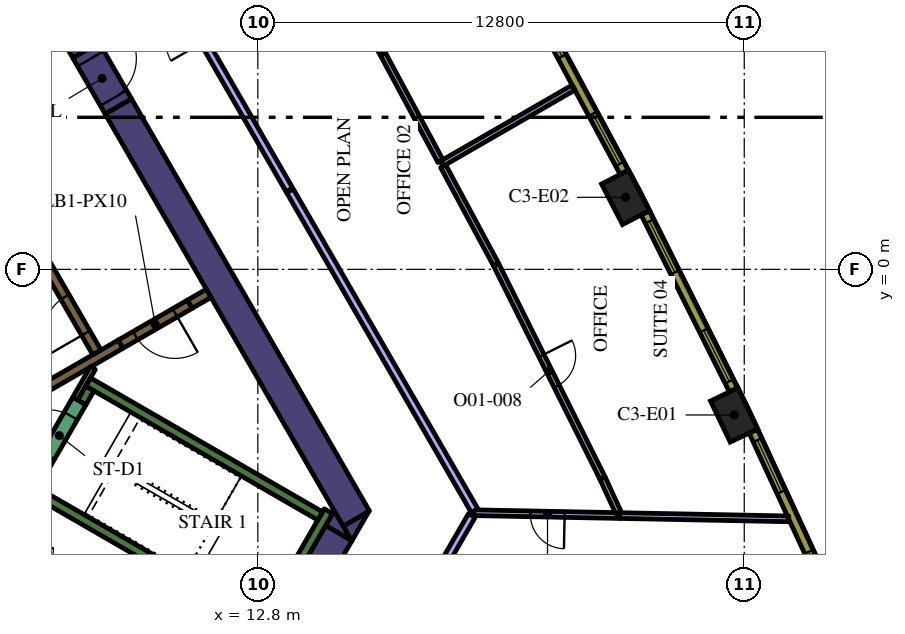
"""IFC4 building model, lengths in metres.
Left out: names, types, materials, properties, quantities, classifications, styles, units other than length and angle.
Written with IfcOpenShell. Run it as: python <this file> out.ifc"""

import sys

from ifc_helpers import new_model, si_unit, direction, frame, frame_2d, origin, origin_2d, place, context, subcontext, project, spatial, polyline, rectangle, outline, extrude, element, fill, save


model = new_model("IFC4")
c1 = context("Model", 3, precision=1e-05, world=origin(), true_north=direction((0.0, 1.0)))
c2 = subcontext(c1, "Body", "Model", "MODEL_VIEW")
j1 = project(units=[si_unit("LENGTHUNIT", "METRE"), si_unit("PLANEANGLEUNIT", "RADIAN")], contexts=[c1])
p1 = place(None, origin())
s1 = spatial("IfcSite", under=j1, at=p1, CompositionType="ELEMENT")
p2 = place(p1, origin())
s2 = spatial("IfcBuilding", under=s1, at=p2, CompositionType="ELEMENT")
p3 = place(p2, frame((0.0, 0.0, 145.8)))
s3 = spatial("IfcBuildingStorey", under=s2, at=p3, CompositionType="ELEMENT", Elevation=145.8)
for number, where, z_axis, x_axis in (
    (1, (25.332, -3.832, 0.0), (0.0, 0.0, 1.0), (-0.433, 0.902, 0.0)),
    (2, (22.476, 1.896, 0.0), (0.0, 0.0, 1.0), (-0.46, 0.888, 0.0)),
):
    element("IfcColumn", number, at=place(p3, frame(where, z_axis=z_axis, x_axis=x_axis)), inside=s3, PredefinedType="COLUMN", context=c2, shape_type="SweptSolid", body=[
        extrude(rectangle(XDim=1.2, YDim=0.8, at=origin_2d()), origin(), (0.0, 0.0, 1.0), 4.2),
    ])
p4 = place(p3, frame((9.129, 4.289, 0.0), z_axis=(0.0, 0.0, 1.0), x_axis=(0.499995742806, -0.866027861663, 0.0)))
e3 = element("IfcWall", 3, at=p4, inside=s3, PredefinedType="SOLIDWALL", context=c2, shape_type="SweptSolid", body=[
    extrude(rectangle(XDim=12.527, YDim=0.8, at=frame_2d((6.264, 0.0))), origin(), (0.0, 0.0, 1.0), 4.2),
])
p5 = place(p3, origin())
e4 = element("IfcWall", 4, at=p5, inside=s3, PredefinedType="SOLIDWALL", context=c2, shape_type="SweptSolid", body=[
    extrude(outline(polyline([(15.271, -7.15), (15.047, -6.762), (15.719, -6.374), (15.271, -7.15)])), origin(), (0.0, 0.0, 1.0), 4.2),
])
p6 = place(p3, frame((13.018, -10.252, 0.0), z_axis=(0.0, 0.0, 1.0), x_axis=(0.499984020225, 0.866034629516, 0.0)))
e5 = element("IfcWall", 5, at=p6, inside=s3, PredefinedType="SOLIDWALL", context=c2, shape_type="SweptSolid", body=[
    extrude(rectangle(XDim=3.824, YDim=0.8, at=frame_2d((1.912, 0.0))), origin(), (0.0, 0.0, 1.0), 4.2),
])
e6 = element("IfcWall", 6, at=p5, inside=s3, PredefinedType="SOLIDWALL", context=c2, shape_type="SweptSolid", body=[
    extrude(outline(polyline([(14.809, -6.35), (15.257, -7.126), (14.585, -6.738), (14.809, -6.35)])), origin(), (0.0, 0.0, 1.0), 4.2),
])
p7 = place(p3, frame((5.615, 10.375, 0.0), z_axis=(0.0, 0.0, 1.0), x_axis=(0.500002746266, -0.866023818221, 0.0)))
e7 = element("IfcWall", 7, at=p7, inside=s3, PredefinedType="SOLIDWALL", context=c2, shape_type="SweptSolid", body=[
    extrude(rectangle(XDim=5.328, YDim=0.8, at=frame_2d((2.664, 0.0))), origin(), (0.0, 0.0, 1.0), 4.2),
])
p8 = place(p3, frame((12.84, -9.511, 0.0), z_axis=(0.0, 0.0, 1.0), x_axis=(0.499997733992, 0.866026712061, 0.0)))
e8 = element("IfcWall", 8, at=p8, inside=s3, PredefinedType="SOLIDWALL", context=c2, shape_type="SweptSolid", body=[
    extrude(rectangle(XDim=3.634, YDim=0.25, at=frame_2d((1.817, 0.0))), origin(), (0.0, 0.0, 1.0), 4.2),
])
p9 = place(p3, frame((12.84, -9.261, 0.0), z_axis=(0.0, 0.0, 1.0), x_axis=(-0.866013990052, 0.500019768644, 0.0)))
e9 = element("IfcWall", 9, at=p9, inside=s3, PredefinedType="SOLIDWALL", context=c2, shape_type="SweptSolid", body=[
    extrude(rectangle(XDim=6.8, YDim=0.25, at=frame_2d((3.4, 0.0))), origin(), (0.0, 0.0, 1.0), 4.2),
])
p10 = place(p3, frame((8.334, -2.964, 0.0), z_axis=(0.0, 0.0, 1.0), x_axis=(0.866016039709, -0.500016218704, 0.0)))
e10 = element("IfcWall", 10, at=p10, inside=s3, PredefinedType="SOLIDWALL", context=c2, shape_type="SweptSolid", body=[
    extrude(rectangle(XDim=7.05, YDim=0.25, at=frame_2d((3.525, 0.0))), origin(), (0.0, 0.0, 1.0), 4.2),
])
p11 = place(p3, frame((8.168, -3.503, 0.0), z_axis=(0.0, 0.0, 1.0), x_axis=(0.49972245349, 0.866185586049, 0.0)))
e11 = element("IfcWall", 11, at=p11, inside=s3, PredefinedType="SOLIDWALL", context=c2, shape_type="SweptSolid", body=[
    extrude(rectangle(XDim=0.425, YDim=0.25, at=frame_2d((0.212, 0.0))), origin(), (0.0, 0.0, 1.0), 4.2),
])
p12 = place(p3, frame((9.19, -1.969, 0.0), z_axis=(0.0, 0.0, 1.0), x_axis=(-0.866057109641, -0.499945079824, 0.0)))
e12 = element("IfcWall", 12, at=p12, inside=s3, PredefinedType="SOLIDWALL", context=c2, shape_type="SweptSolid", body=[
    extrude(rectangle(XDim=3.291, YDim=0.25, at=frame_2d((1.646, 0.0))), origin(), (0.0, 0.0, 1.0), 4.2),
])
p13 = place(p3, frame((11.507, -0.631, 0.0), z_axis=(0.0, 0.0, 1.0), x_axis=(-0.866093731455, -0.499881634324, 0.0)))
e13 = element("IfcWall", 13, at=p13, inside=s3, PredefinedType="SOLIDWALL", context=c2, shape_type="SweptSolid", body=[
    extrude(rectangle(XDim=0.575, YDim=0.25, at=frame_2d((0.288, 0.0))), origin(), (0.0, 0.0, 1.0), 4.2),
])
p14 = place(p3, frame((8.459, -2.599, 0.0), z_axis=(0.0, 0.0, 1.0), x_axis=(-0.500041054325, -0.866001699761, 0.0)))
e14 = element("IfcWall", 14, at=p14, inside=s3, PredefinedType="PARTITIONING", context=c2, shape_type="SweptSolid", body=[
    extrude(rectangle(XDim=0.929, YDim=0.15, at=frame_2d((0.464, 0.0))), origin(), (0.0, 0.0, 1.0), 4.2),
])
p15 = place(p3, frame((8.565, -2.185, 0.0), z_axis=(0.0, 0.0, 1.0), x_axis=(-0.499997954832, 0.866026584559, 0.0)))
e15 = element("IfcWall", 15, at=p15, inside=s3, PredefinedType="SOLIDWALL", context=c2, shape_type="SweptSolid", body=[
    extrude(rectangle(XDim=12.35, YDim=0.25, at=frame_2d((6.175, 0.0))), origin(), (0.0, 0.0, 1.0), 4.2),
])
p16 = place(p15, frame((0.585, 0.0, 0.0)))
e16 = element("IfcOpeningElement", 16, at=p16, cuts=e15, PredefinedType="OPENING", context=c2, shape_type="SweptSolid", body=[
    extrude(rectangle(XDim=1.1, YDim=2.1, at=frame_2d((0.55, 1.05))), frame((0.0, 0.135, 0.0), z_axis=(0.0, -1.0, 0.0), x_axis=(1.0, 0.0, 0.0)), (0.0, 0.0, 1.0), 0.27),
])
p17 = place(p3, frame((7.053, -5.284, 0.0), z_axis=(0.0, 0.0, 1.0), x_axis=(0.500078061341, 0.865980330357, 0.0)))
e17 = element("IfcWall", 17, at=p17, inside=s3, PredefinedType="SOLIDWALL", context=c2, shape_type="SweptSolid", body=[
    extrude(rectangle(XDim=2.1, YDim=0.4, at=frame_2d((1.05, 0.0))), origin(), (0.0, 0.0, 1.0), 4.2),
])
p18 = place(p17, frame((0.45, 0.0, 0.0)))
e18 = element("IfcOpeningElement", 18, at=p18, cuts=e17, PredefinedType="OPENING", context=c2, shape_type="SweptSolid", body=[
    extrude(rectangle(XDim=1.2, YDim=2.1, at=frame_2d((0.6, 1.05))), frame((0.0, 0.21, 0.0), z_axis=(0.0, -1.0, 0.0), x_axis=(1.0, 0.0, 0.0)), (0.0, 0.0, 1.0), 0.42),
])
p19 = place(p3, frame((11.009, -0.919, 0.0), z_axis=(0.0, 0.0, 1.0), x_axis=(-0.866059744384, -0.49994051562, 0.0)))
e19 = element("IfcWall", 19, at=p19, inside=s3, PredefinedType="SOLIDWALL", context=c2, shape_type="SweptSolid", body=[
    extrude(rectangle(XDim=2.1, YDim=0.25, at=frame_2d((1.05, 0.0))), origin(), (0.0, 0.0, 1.0), 4.2),
])
p20 = place(p19, frame((0.45, 0.0, 0.0)))
e20 = element("IfcOpeningElement", 20, at=p20, cuts=e19, PredefinedType="OPENING", context=c2, shape_type="SweptSolid", body=[
    extrude(rectangle(XDim=1.2, YDim=2.1, at=frame_2d((0.6, 1.05))), frame((0.0, 0.135, 0.0), z_axis=(0.0, -1.0, 0.0), x_axis=(1.0, 0.0, 0.0)), (0.0, 0.0, 1.0), 0.27),
])
p21 = place(p3, frame((8.279, 5.761, 0.0), z_axis=(0.0, 0.0, 1.0), x_axis=(0.500062241894, -0.865989465428, 0.0)))
e21 = element("IfcWall", 21, at=p21, inside=s3, PredefinedType="SOLIDWALL", context=c2, shape_type="SweptSolid", body=[
    extrude(rectangle(XDim=1.7, YDim=0.8, at=frame_2d((0.85, 0.0))), origin(), (0.0, 0.0, 1.0), 4.2),
])
p22 = place(p21, frame((0.25, 0.0, 0.0)))
e22 = element("IfcOpeningElement", 22, at=p22, cuts=e21, PredefinedType="OPENING", context=c2, shape_type="SweptSolid", body=[
    extrude(rectangle(XDim=1.2, YDim=2.1, at=frame_2d((0.6, 1.05))), frame((0.0, 0.41, 0.0), z_axis=(0.0, -1.0, 0.0), x_axis=(1.0, 0.0, 0.0)), (0.0, 0.0, 1.0), 0.82),
])
p23 = place(p3, frame((22.32, -6.479, 0.0), z_axis=(0.0, 0.0, 1.0), x_axis=(0.999809252738, -0.019530953357, 0.0)))
e23 = element("IfcWall", 23, at=p23, inside=s3, PredefinedType="PARTITIONING", context=c2, shape_type="SweptSolid", body=[
    extrude(rectangle(XDim=4.45, YDim=0.15, at=frame_2d((2.225, 0.0))), origin(), (0.0, 0.0, 1.0), 3.15),
])
p24 = place(p3, frame((22.328, -6.479, 0.0), z_axis=(0.0, 0.0, 1.0), x_axis=(-0.999809811932, 0.019502306655, 0.0)))
e24 = element("IfcWall", 24, at=p24, inside=s3, PredefinedType="PARTITIONING", context=c2, shape_type="SweptSolid", body=[
    extrude(rectangle(XDim=3.856, YDim=0.15, at=frame_2d((1.928, 0.0))), origin(), (0.0, 0.0, 1.0), 3.15),
])
p25 = place(p24, frame((1.456, 0.0, 0.0)))
e25 = element("IfcOpeningElement", 25, at=p25, cuts=e24, PredefinedType="OPENING", context=c2, shape_type="SweptSolid", body=[
    extrude(rectangle(XDim=0.9, YDim=2.1, at=frame_2d((0.45, 1.05))), frame((0.0, 0.085, 0.0), z_axis=(0.0, -1.0, 0.0), x_axis=(1.0, 0.0, 0.0)), (0.0, 0.0, 1.0), 0.17),
])
p26 = place(p3, frame((16.678, -9.513, 0.0), z_axis=(0.0, 0.0, 1.0), x_axis=(0.500011844827, 0.866018565062, 0.0)))
e26 = element("IfcWall", 26, at=p26, inside=s3, PredefinedType="PARTITIONING", context=c2, shape_type="SweptSolid", body=[
    extrude(rectangle(XDim=3.505, YDim=0.2, at=frame_2d((1.753, 0.0))), origin(), (0.0, 0.0, 1.0), 3.15),
])
p27 = place(p3, frame((17.641, 2.781, 0.0), z_axis=(0.0, 0.0, 1.0), x_axis=(0.866053520969, 0.499951296445, 0.0)))
e27 = element("IfcWall", 27, at=p27, inside=s3, PredefinedType="PARTITIONING", context=c2, shape_type="SweptSolid", body=[
    extrude(rectangle(XDim=4.002, YDim=0.15, at=frame_2d((2.001, 0.0))), origin(), (0.0, 0.0, 1.0), 3.15),
])
p28 = place(p3, frame((22.289, -6.403, 0.0), z_axis=(0.0, 0.0, 1.0), x_axis=(-0.41893460807, 0.908016406328, 0.0)))
e28 = element("IfcWall", 28, at=p28, inside=s3, PredefinedType="PARTITIONING", context=c2, shape_type="SweptSolid", body=[
    extrude(rectangle(XDim=1.002, YDim=0.15, at=frame_2d((0.501, 0.0))), origin(), (0.0, 0.0, 1.0), 3.15),
])
p29 = place(p3, frame((19.066, 0.129, 0.0), z_axis=(0.0, 0.0, 1.0), x_axis=(0.446202922071, -0.89493181435, 0.0)))
e29 = element("IfcWall", 29, at=p29, inside=s3, PredefinedType="PARTITIONING", context=c2, shape_type="SweptSolid", body=[
    extrude(rectangle(XDim=6.282, YDim=0.15, at=frame_2d((3.141, 0.0))), origin(), (0.0, 0.0, 1.0), 3.15),
])
p30 = place(p29, frame((2.683, 0.0, 0.0)))
e30 = element("IfcOpeningElement", 30, at=p30, cuts=e29, PredefinedType="OPENING", context=c2, shape_type="SweptSolid", body=[
    extrude(rectangle(XDim=0.9, YDim=2.1, at=frame_2d((0.45, 1.05))), frame((0.0, 0.085, 0.0), z_axis=(0.0, -1.0, 0.0), x_axis=(1.0, 0.0, 0.0)), (0.0, 0.0, 1.0), 0.17),
])
p31 = place(p3, frame((19.066, 0.129, 0.0), z_axis=(0.0, 0.0, 1.0), x_axis=(-0.473335829303, 0.880882053795, 0.0)))
e31 = element("IfcWall", 31, at=p31, inside=s3, PredefinedType="PARTITIONING", context=c2, shape_type="SweptSolid", body=[
    extrude(rectangle(XDim=2.935, YDim=0.15, at=frame_2d((1.468, 0.0))), origin(), (0.0, 0.0, 1.0), 3.15),
])
p32 = place(p3, frame((17.606, 2.847, 0.0), z_axis=(0.0, 0.0, 1.0), x_axis=(-0.473348321673, 0.880875340993, 0.0)))
e32 = element("IfcWall", 32, at=p32, inside=s3, PredefinedType="PARTITIONING", context=c2, shape_type="SweptSolid", body=[
    extrude(rectangle(XDim=3.197, YDim=0.15, at=frame_2d((1.599, 0.0))), origin(), (0.0, 0.0, 1.0), 3.15),
])
p33 = place(p3, frame((12.951, 11.104, 0.0), z_axis=(0.0, 0.0, 1.0), x_axis=(0.499992691614, -0.866029623242, 0.0)))
e33 = element("IfcWall", 33, at=p33, inside=s3, PredefinedType="PARTITIONING", context=c2, shape_type="SweptSolid", body=[
    extrude(rectangle(XDim=6.282, YDim=0.15, at=frame_2d((3.141, 0.0))), origin(), (0.0, 0.0, 1.0), 3.15),
])
p34 = place(p33, frame((2.683, 0.0, 0.0)))
e34 = element("IfcOpeningElement", 34, at=p34, cuts=e33, PredefinedType="OPENING", context=c2, shape_type="SweptSolid", body=[
    extrude(rectangle(XDim=0.9, YDim=2.1, at=frame_2d((0.45, 1.05))), frame((0.0, 0.085, 0.0), z_axis=(0.0, -1.0, 0.0), x_axis=(1.0, 0.0, 0.0)), (0.0, 0.0, 1.0), 0.17),
])
p35 = place(p3, frame((13.63, 2.091, 0.0), z_axis=(0.0, 0.0, 1.0), x_axis=(-0.499990634175, 0.866030811078, 0.0)))
e35 = element("IfcWall", 35, at=p35, inside=s3, PredefinedType="PARTITIONING", context=c2, shape_type="SweptSolid", body=[
    extrude(rectangle(XDim=10.008, YDim=0.2, at=frame_2d((5.004, 0.0))), origin(), (0.0, 0.0, 1.0), 3.15),
])
p36 = place(p35, frame((4.5, 0.0, 0.0)))
e36 = element("IfcOpeningElement", 36, at=p36, cuts=e35, PredefinedType="OPENING", context=c2, shape_type="SweptSolid", body=[
    extrude(rectangle(XDim=1.0, YDim=2.1, at=frame_2d((0.5, 1.05))), frame((0.0, 0.11, 0.0), z_axis=(0.0, -1.0, 0.0), x_axis=(1.0, 0.0, 0.0)), (0.0, 0.0, 1.0), 0.22),
])
p37 = place(p3, frame((18.504, -6.35, 0.0), z_axis=(0.0, 0.0, 1.0), x_axis=(-0.499995029582, 0.866028273438, 0.0)))
e37 = element("IfcWall", 37, at=p37, inside=s3, PredefinedType="PARTITIONING", context=c2, shape_type="SweptSolid", body=[
    extrude(rectangle(XDim=9.717, YDim=0.2, at=frame_2d((4.859, 0.0))), origin(), (0.0, 0.0, 1.0), 3.15),
])
p38 = place(p3, frame((28.02, -8.992, 0.0), z_axis=(0.0, 0.0, 1.0), x_axis=(-0.418722559465, 0.908114209885, 0.0)))
e38 = element("IfcWall", 38, at=p38, inside=s3, PredefinedType="SOLIDWALL", context=c2, shape_type="SweptSolid", body=[
    extrude(rectangle(XDim=5.213, YDim=0.24, at=frame_2d((2.606, 0.0))), origin(), (0.0, 0.0, 1.0), 3.95),
])
p39 = place(p38, frame((0.221, 0.0, 0.9)))
e39 = element("IfcOpeningElement", 39, at=p39, cuts=e38, PredefinedType="OPENING", context=c2, shape_type="SweptSolid", body=[
    extrude(rectangle(XDim=1.5, YDim=2.55, at=frame_2d((0.75, 1.275))), frame((0.0, 0.13, 0.0), z_axis=(0.0, -1.0, 0.0), x_axis=(1.0, 0.0, 0.0)), (0.0, 0.0, 1.0), 0.26),
])
p40 = place(p38, frame((3.452, 0.0, 0.9)))
e40 = element("IfcOpeningElement", 40, at=p40, cuts=e38, PredefinedType="OPENING", context=c2, shape_type="SweptSolid", body=[
    extrude(rectangle(XDim=1.5, YDim=2.55, at=frame_2d((0.75, 1.275))), frame((0.0, 0.13, 0.0), z_axis=(0.0, -1.0, 0.0), x_axis=(1.0, 0.0, 0.0)), (0.0, 0.0, 1.0), 0.26),
])
p41 = place(p3, frame((25.316, -3.171, 0.0), z_axis=(0.0, 0.0, 1.0), x_axis=(-0.446256171312, 0.8949052629, 0.0)))
e41 = element("IfcWall", 41, at=p41, inside=s3, PredefinedType="SOLIDWALL", context=c2, shape_type="SweptSolid", body=[
    extrude(rectangle(XDim=5.203, YDim=0.24, at=frame_2d((2.602, 0.0))), origin(), (0.0, 0.0, 1.0), 3.95),
])
p42 = place(p41, frame((0.248, 0.0, 0.9)))
e42 = element("IfcOpeningElement", 42, at=p42, cuts=e41, PredefinedType="OPENING", context=c2, shape_type="SweptSolid", body=[
    extrude(rectangle(XDim=1.5, YDim=2.55, at=frame_2d((0.75, 1.275))), frame((0.0, 0.13, 0.0), z_axis=(0.0, -1.0, 0.0), x_axis=(1.0, 0.0, 0.0)), (0.0, 0.0, 1.0), 0.26),
])
p43 = place(p41, frame((3.455, 0.0, 0.9)))
e43 = element("IfcOpeningElement", 43, at=p43, cuts=e41, PredefinedType="OPENING", context=c2, shape_type="SweptSolid", body=[
    extrude(rectangle(XDim=1.5, YDim=2.55, at=frame_2d((0.75, 1.275))), frame((0.0, 0.13, 0.0), z_axis=(0.0, -1.0, 0.0), x_axis=(1.0, 0.0, 0.0)), (0.0, 0.0, 1.0), 0.26),
])
p44 = place(p3, frame((22.44, 2.555, 0.0), z_axis=(0.0, 0.0, 1.0), x_axis=(-0.473349833294, 0.880874528704, 0.0)))
e44 = element("IfcWall", 44, at=p44, inside=s3, PredefinedType="SOLIDWALL", context=c2, shape_type="SweptSolid", body=[
    extrude(rectangle(XDim=5.204, YDim=0.24, at=frame_2d((2.602, 0.0))), origin(), (0.0, 0.0, 1.0), 3.95),
])
p45 = place(p44, frame((0.248, 0.0, 0.9)))
e45 = element("IfcOpeningElement", 45, at=p45, cuts=e44, PredefinedType="OPENING", context=c2, shape_type="SweptSolid", body=[
    extrude(rectangle(XDim=1.5, YDim=2.55, at=frame_2d((0.75, 1.275))), frame((0.0, 0.13, 0.0), z_axis=(0.0, -1.0, 0.0), x_axis=(1.0, 0.0, 0.0)), (0.0, 0.0, 1.0), 0.26),
])
p46 = place(p44, frame((3.455, 0.0, 0.9)))
e46 = element("IfcOpeningElement", 46, at=p46, cuts=e44, PredefinedType="OPENING", context=c2, shape_type="SweptSolid", body=[
    extrude(rectangle(XDim=1.5, YDim=2.55, at=frame_2d((0.75, 1.275))), frame((0.0, 0.13, 0.0), z_axis=(0.0, -1.0, 0.0), x_axis=(1.0, 0.0, 0.0)), (0.0, 0.0, 1.0), 0.26),
])
p47 = place(p16, origin())
e47 = element("IfcDoor", 47, at=p47, inside=s3, OperationType="DOUBLE_DOOR_SLIDING", PredefinedType="DOOR", context=c2, shape_type="SweptSolid", body=[
    extrude(rectangle(XDim=1.1, YDim=2.1, at=frame_2d((0.55, 1.05))), frame((0.0, 0.025, 0.0), z_axis=(0.0, -1.0, 0.0), x_axis=(1.0, 0.0, 0.0)), (0.0, 0.0, 1.0), 0.05),
])
fill(e16, e47)
p48 = place(p18, origin())
e48 = element("IfcDoor", 48, at=p48, inside=s3, OperationType="SINGLE_SWING_LEFT", PredefinedType="DOOR", context=c2, shape_type="SweptSolid", body=[
    extrude(rectangle(XDim=1.2, YDim=2.1, at=frame_2d((0.6, 1.05))), frame((0.0, 0.025, 0.0), z_axis=(0.0, -1.0, 0.0), x_axis=(1.0, 0.0, 0.0)), (0.0, 0.0, 1.0), 0.05),
])
fill(e18, e48)
p49 = place(p20, origin())
e49 = element("IfcDoor", 49, at=p49, inside=s3, OperationType="SINGLE_SWING_LEFT", PredefinedType="DOOR", context=c2, shape_type="SweptSolid", body=[
    extrude(rectangle(XDim=1.2, YDim=2.1, at=frame_2d((0.6, 1.05))), frame((0.0, 0.025, 0.0), z_axis=(0.0, -1.0, 0.0), x_axis=(1.0, 0.0, 0.0)), (0.0, 0.0, 1.0), 0.05),
])
fill(e20, e49)
p50 = place(p22, origin())
e50 = element("IfcDoor", 50, at=p50, inside=s3, OperationType="SINGLE_SWING_LEFT", PredefinedType="DOOR", context=c2, shape_type="SweptSolid", body=[
    extrude(rectangle(XDim=1.2, YDim=2.1, at=frame_2d((0.6, 1.05))), frame((0.0, 0.025, 0.0), z_axis=(0.0, -1.0, 0.0), x_axis=(1.0, 0.0, 0.0)), (0.0, 0.0, 1.0), 0.05),
])
fill(e22, e50)
p51 = place(p25, origin())
e51 = element("IfcDoor", 51, at=p51, inside=s3, OperationType="SINGLE_SWING_LEFT", PredefinedType="DOOR", context=c2, shape_type="SweptSolid", body=[
    extrude(rectangle(XDim=0.9, YDim=2.1, at=frame_2d((0.45, 1.05))), frame((0.0, 0.025, 0.0), z_axis=(0.0, -1.0, 0.0), x_axis=(1.0, 0.0, 0.0)), (0.0, 0.0, 1.0), 0.05),
])
fill(e25, e51)
p52 = place(p30, origin())
e52 = element("IfcDoor", 52, at=p52, inside=s3, OperationType="SINGLE_SWING_LEFT", PredefinedType="DOOR", context=c2, shape_type="SweptSolid", body=[
    extrude(rectangle(XDim=0.9, YDim=2.1, at=frame_2d((0.45, 1.05))), frame((0.0, 0.025, 0.0), z_axis=(0.0, -1.0, 0.0), x_axis=(1.0, 0.0, 0.0)), (0.0, 0.0, 1.0), 0.05),
])
fill(e30, e52)
p53 = place(p39, origin())
e53 = element("IfcWindow", 53, at=p53, inside=s3, PartitioningType="SINGLE_PANEL", PredefinedType="WINDOW", context=c2, shape_type="SweptSolid", body=[
    extrude(rectangle(XDim=1.5, YDim=2.55, at=frame_2d((0.75, 1.275))), frame((0.0, 0.04, 0.0), z_axis=(0.0, -1.0, 0.0), x_axis=(1.0, 0.0, 0.0)), (0.0, 0.0, 1.0), 0.06),
])
fill(e39, e53)
p54 = place(p40, origin())
e54 = element("IfcWindow", 54, at=p54, inside=s3, PartitioningType="SINGLE_PANEL", PredefinedType="WINDOW", context=c2, shape_type="SweptSolid", body=[
    extrude(rectangle(XDim=1.5, YDim=2.55, at=frame_2d((0.75, 1.275))), frame((0.0, 0.04, 0.0), z_axis=(0.0, -1.0, 0.0), x_axis=(1.0, 0.0, 0.0)), (0.0, 0.0, 1.0), 0.06),
])
fill(e40, e54)
p55 = place(p42, origin())
e55 = element("IfcWindow", 55, at=p55, inside=s3, PartitioningType="SINGLE_PANEL", PredefinedType="WINDOW", context=c2, shape_type="SweptSolid", body=[
    extrude(rectangle(XDim=1.5, YDim=2.55, at=frame_2d((0.75, 1.275))), frame((0.0, 0.04, 0.0), z_axis=(0.0, -1.0, 0.0), x_axis=(1.0, 0.0, 0.0)), (0.0, 0.0, 1.0), 0.06),
])
fill(e42, e55)
p56 = place(p43, origin())
e56 = element("IfcWindow", 56, at=p56, inside=s3, PartitioningType="SINGLE_PANEL", PredefinedType="WINDOW", context=c2, shape_type="SweptSolid", body=[
    extrude(rectangle(XDim=1.5, YDim=2.55, at=frame_2d((0.75, 1.275))), frame((0.0, 0.04, 0.0), z_axis=(0.0, -1.0, 0.0), x_axis=(1.0, 0.0, 0.0)), (0.0, 0.0, 1.0), 0.06),
])
fill(e43, e56)
p57 = place(p45, origin())
e57 = element("IfcWindow", 57, at=p57, inside=s3, PartitioningType="SINGLE_PANEL", PredefinedType="WINDOW", context=c2, shape_type="SweptSolid", body=[
    extrude(rectangle(XDim=1.5, YDim=2.55, at=frame_2d((0.75, 1.275))), frame((0.0, 0.04, 0.0), z_axis=(0.0, -1.0, 0.0), x_axis=(1.0, 0.0, 0.0)), (0.0, 0.0, 1.0), 0.06),
])
fill(e45, e57)
p58 = place(p46, origin())
e58 = element("IfcWindow", 58, at=p58, inside=s3, PartitioningType="SINGLE_PANEL", PredefinedType="WINDOW", context=c2, shape_type="SweptSolid", body=[
    extrude(rectangle(XDim=1.5, YDim=2.55, at=frame_2d((0.75, 1.275))), frame((0.0, 0.04, 0.0), z_axis=(0.0, -1.0, 0.0), x_axis=(1.0, 0.0, 0.0)), (0.0, 0.0, 1.0), 0.06),
])
fill(e46, e58)
save(model, sys.argv[1])
